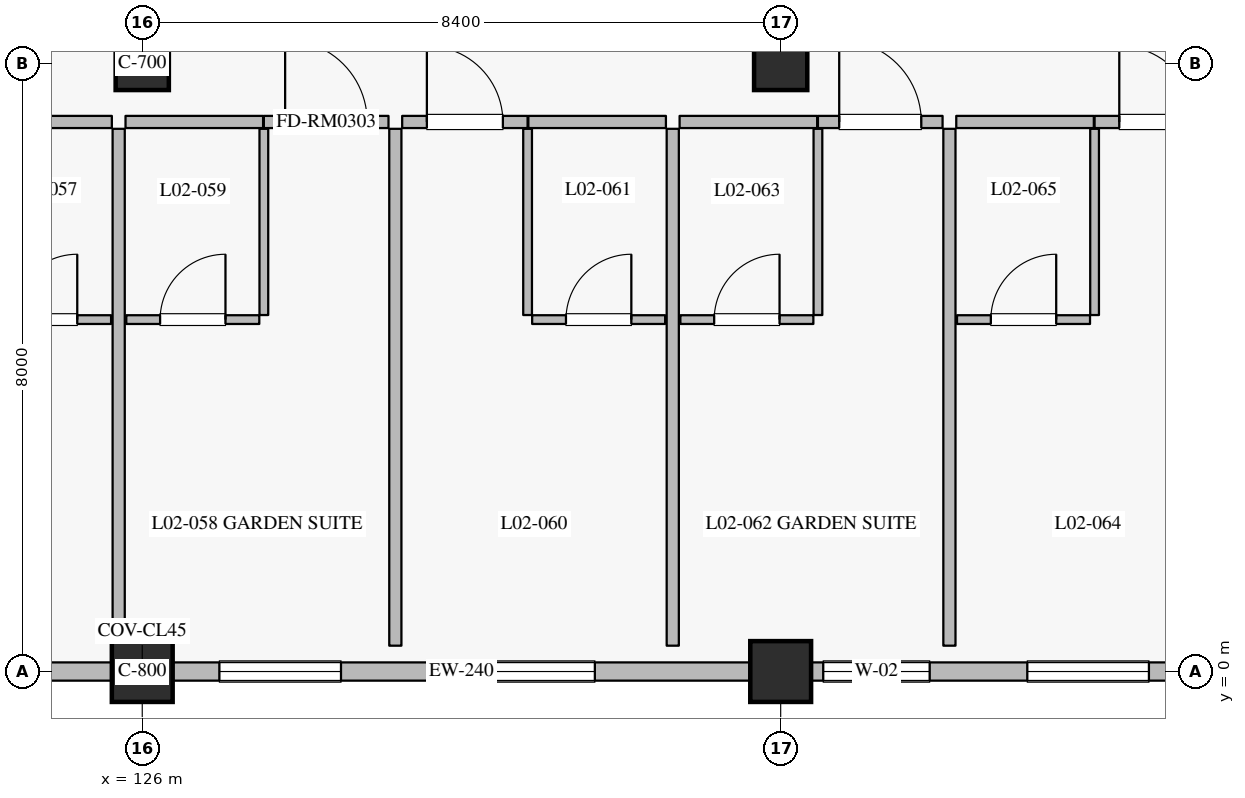
"""IFC4 building model, lengths in metres.
Left out: names, types, materials, properties, quantities, classifications, styles, units other than length and angle.
Written with IfcOpenShell. Run it as: python <this file> out.ifc"""

import sys

from ifc_helpers import new_model, si_unit, direction, frame, frame_2d, origin, origin_2d, place, context, subcontext, project, spatial, rectangle, extrude, element, fill, save


model = new_model("IFC4")
c1 = context("Model", 3, precision=1e-05, world=origin(), true_north=direction((0.0, 1.0)))
c2 = subcontext(c1, "Body", "Model", "MODEL_VIEW")
j1 = project(units=[si_unit("LENGTHUNIT", "METRE"), si_unit("PLANEANGLEUNIT", "RADIAN")], contexts=[c1])
p1 = place(None, origin())
s1 = spatial("IfcSite", under=j1, at=p1, CompositionType="ELEMENT")
p2 = place(p1, origin())
s2 = spatial("IfcBuilding", under=s1, at=p2, CompositionType="ELEMENT")
p3 = place(p2, frame((0.0, 0.0, 11.4)))
s3 = spatial("IfcBuildingStorey", under=s2, at=p3, CompositionType="ELEMENT", Elevation=11.4)
for number, where, z_axis, x_axis in (
    (1, (126.0, 0.0, 0.0), (0.0, 0.0, 1.0), (1.0, 0.0, 0.0)),
    (2, (134.4, 0.0, 0.0), (0.0, 0.0, 1.0), (1.0, 0.0, 0.0)),
):
    element("IfcColumn", number, at=place(p3, frame(where, z_axis=z_axis, x_axis=x_axis)), inside=s3, PredefinedType="COLUMN", context=c2, shape_type="SweptSolid", body=[
        extrude(rectangle(XDim=0.8, YDim=0.8, at=origin_2d()), origin(), (0.0, 0.0, 1.0), 4.8),
    ])
for number, where, z_axis, x_axis in (
    (3, (126.0, 8.0, 0.0), (0.0, 0.0, 1.0), (1.0, 0.0, 0.0)),
    (4, (134.4, 8.0, 0.0), (0.0, 0.0, 1.0), (1.0, 0.0, 0.0)),
):
    element("IfcColumn", number, at=place(p3, frame(where, z_axis=z_axis, x_axis=x_axis)), inside=s3, PredefinedType="COLUMN", context=c2, shape_type="SweptSolid", body=[
        extrude(rectangle(XDim=0.7, YDim=0.7, at=origin_2d()), origin(), (0.0, 0.0, 1.0), 4.8),
    ])
p4 = place(p3, frame((125.6, 0.0, 0.0), z_axis=(0.0, 0.0, 1.0), x_axis=(-1.0, 0.0, 0.0)))
e5 = element("IfcWall", 5, at=p4, inside=s3, PredefinedType="SOLIDWALL", context=c2, shape_type="SweptSolid", body=[
    extrude(rectangle(XDim=7.6, YDim=0.24, at=frame_2d((3.8, 0.0))), origin(), (0.0, 0.0, 1.0), 4.13),
])
p5 = place(p4, frame((0.935, 0.0, 0.8)))
e6 = element("IfcOpeningElement", 6, at=p5, cuts=e5, PredefinedType="OPENING", context=c2, shape_type="SweptSolid", body=[
    extrude(rectangle(XDim=1.6, YDim=1.6, at=frame_2d((0.8, 0.8))), frame((0.0, 0.13, 0.0), z_axis=(0.0, -1.0, 0.0), x_axis=(1.0, 0.0, 0.0)), (0.0, 0.0, 1.0), 0.26),
])
p6 = place(p4, frame((4.58, 0.0, 0.8)))
e7 = element("IfcOpeningElement", 7, at=p6, cuts=e5, PredefinedType="OPENING", context=c2, shape_type="SweptSolid", body=[
    extrude(rectangle(XDim=1.6, YDim=1.6, at=frame_2d((0.8, 0.8))), frame((0.0, 0.13, 0.0), z_axis=(0.0, -1.0, 0.0), x_axis=(1.0, 0.0, 0.0)), (0.0, 0.0, 1.0), 0.26),
])
p7 = place(p3, frame((134.0, 0.0, 0.0), z_axis=(0.0, 0.0, 1.0), x_axis=(-1.0, 0.0, 0.0)))
e8 = element("IfcWall", 8, at=p7, inside=s3, PredefinedType="SOLIDWALL", context=c2, shape_type="SweptSolid", body=[
    extrude(rectangle(XDim=7.6, YDim=0.24, at=frame_2d((3.8, 0.0))), origin(), (0.0, 0.0, 1.0), 4.13),
])
p8 = place(p7, frame((2.045, 0.0, 0.8)))
e9 = element("IfcOpeningElement", 9, at=p8, cuts=e8, PredefinedType="OPENING", context=c2, shape_type="SweptSolid", body=[
    extrude(rectangle(XDim=1.6, YDim=1.6, at=frame_2d((0.8, 0.8))), frame((0.0, 0.13, 0.0), z_axis=(0.0, -1.0, 0.0), x_axis=(1.0, 0.0, 0.0)), (0.0, 0.0, 1.0), 0.26),
])
p9 = place(p7, frame((5.385, 0.0, 0.8)))
e10 = element("IfcOpeningElement", 10, at=p9, cuts=e8, PredefinedType="OPENING", context=c2, shape_type="SweptSolid", body=[
    extrude(rectangle(XDim=1.6, YDim=1.6, at=frame_2d((0.8, 0.8))), frame((0.0, 0.13, 0.0), z_axis=(0.0, -1.0, 0.0), x_axis=(1.0, 0.0, 0.0)), (0.0, 0.0, 1.0), 0.26),
])
p10 = place(p3, frame((142.4, 0.0, 0.0), z_axis=(0.0, 0.0, 1.0), x_axis=(-1.0, 0.0, 0.0)))
e11 = element("IfcWall", 11, at=p10, inside=s3, PredefinedType="SOLIDWALL", context=c2, shape_type="SweptSolid", body=[
    extrude(rectangle(XDim=7.6, YDim=0.24, at=frame_2d((3.8, 0.0))), origin(), (0.0, 0.0, 1.0), 4.13),
])
p11 = place(p10, frame((0.215, 0.0, 0.8)))
e12 = element("IfcOpeningElement", 12, at=p11, cuts=e11, PredefinedType="OPENING", context=c2, shape_type="SweptSolid", body=[
    extrude(rectangle(XDim=1.6, YDim=1.6, at=frame_2d((0.8, 0.8))), frame((0.0, 0.13, 0.0), z_axis=(0.0, -1.0, 0.0), x_axis=(1.0, 0.0, 0.0)), (0.0, 0.0, 1.0), 0.26),
])
p12 = place(p10, frame((3.155, 0.0, 0.8)))
e13 = element("IfcOpeningElement", 13, at=p12, cuts=e11, PredefinedType="OPENING", context=c2, shape_type="SweptSolid", body=[
    extrude(rectangle(XDim=1.6, YDim=1.6, at=frame_2d((0.8, 0.8))), frame((0.0, 0.13, 0.0), z_axis=(0.0, -1.0, 0.0), x_axis=(1.0, 0.0, 0.0)), (0.0, 0.0, 1.0), 0.26),
])
p13 = place(p10, frame((6.04, 0.0, 0.8)))
e14 = element("IfcOpeningElement", 14, at=p13, cuts=e11, PredefinedType="OPENING", context=c2, shape_type="SweptSolid", body=[
    extrude(rectangle(XDim=1.4, YDim=1.6, at=frame_2d((0.7, 0.8))), frame((0.0, 0.13, 0.0), z_axis=(0.0, -1.0, 0.0), x_axis=(1.0, 0.0, 0.0)), (0.0, 0.0, 1.0), 0.26),
])
p14 = place(p3, frame((123.79, 7.23, 0.0), z_axis=(0.0, 0.0, 1.0), x_axis=(1.0, 0.0, 0.0)))
e15 = element("IfcWall", 15, at=p14, inside=s3, PredefinedType="PARTITIONING", context=c2, shape_type="SweptSolid", body=[
    extrude(rectangle(XDim=1.81, YDim=0.16, at=frame_2d((0.905, 0.0))), origin(), (0.0, 0.0, 1.0), 4.535),
])
p15 = place(p3, frame((123.84, 4.63, 0.0), z_axis=(0.0, 0.0, 1.0), x_axis=(1.0, 0.0, 0.0)))
e16 = element("IfcWall", 16, at=p15, inside=s3, PredefinedType="PARTITIONING", context=c2, shape_type="SweptSolid", body=[
    extrude(rectangle(XDim=1.75, YDim=0.115, at=frame_2d((0.875, 0.0))), origin(), (0.0, 0.0, 1.0), 4.535),
])
p16 = place(p15, frame((0.445, 0.0, 0.0)))
e17 = element("IfcOpeningElement", 17, at=p16, cuts=e16, PredefinedType="OPENING", context=c2, shape_type="SweptSolid", body=[
    extrude(rectangle(XDim=0.86, YDim=2.12, at=frame_2d((0.43, 1.06))), frame((0.0, 0.067, 0.0), z_axis=(0.0, -1.0, 0.0), x_axis=(1.0, 0.0, 0.0)), (0.0, 0.0, 1.0), 0.135),
])
p17 = place(p3, frame((125.78, 7.23, 0.0), z_axis=(0.0, 0.0, 1.0), x_axis=(1.0, 0.0, 0.0)))
e18 = element("IfcWall", 18, at=p17, inside=s3, PredefinedType="PARTITIONING", context=c2, shape_type="SweptSolid", body=[
    extrude(rectangle(XDim=1.81, YDim=0.16, at=frame_2d((0.905, 0.0))), origin(), (0.0, 0.0, 1.0), 4.535),
])
p18 = place(p3, frame((127.6, 7.23, 0.0), z_axis=(0.0, 0.0, 1.0), x_axis=(1.0, 0.0, 0.0)))
e19 = element("IfcWall", 19, at=p18, inside=s3, PredefinedType="PARTITIONING", context=c2, shape_type="SweptSolid", body=[
    extrude(rectangle(XDim=1.64, YDim=0.16, at=frame_2d((0.82, 0.0))), origin(), (0.0, 0.0, 1.0), 4.535),
])
p19 = place(p18, frame((0.28, 0.0, 0.0)))
e20 = element("IfcOpeningElement", 20, at=p19, cuts=e19, PredefinedType="OPENING", context=c2, shape_type="SweptSolid", body=[
    extrude(rectangle(XDim=1.08, YDim=2.3, at=frame_2d((0.54, 1.15))), frame((0.0, 0.09, 0.0), z_axis=(0.0, -1.0, 0.0), x_axis=(1.0, 0.0, 0.0)), (0.0, 0.0, 1.0), 0.18),
])
p20 = place(p3, frame((127.6, 4.69, 0.0), z_axis=(0.0, 0.0, 1.0), x_axis=(0.0, 1.0, 0.0)))
e21 = element("IfcWall", 21, at=p20, inside=s3, PredefinedType="PARTITIONING", context=c2, shape_type="SweptSolid", body=[
    extrude(rectangle(XDim=2.45, YDim=0.115, at=frame_2d((1.225, 0.0))), origin(), (0.0, 0.0, 1.0), 4.535),
])
p21 = place(p3, frame((125.79, 4.63, 0.0), z_axis=(0.0, 0.0, 1.0), x_axis=(1.0, 0.0, 0.0)))
e22 = element("IfcWall", 22, at=p21, inside=s3, PredefinedType="PARTITIONING", context=c2, shape_type="SweptSolid", body=[
    extrude(rectangle(XDim=1.75, YDim=0.115, at=frame_2d((0.875, 0.0))), origin(), (0.0, 0.0, 1.0), 4.535),
])
p22 = place(p21, frame((0.445, 0.0, 0.0)))
e23 = element("IfcOpeningElement", 23, at=p22, cuts=e22, PredefinedType="OPENING", context=c2, shape_type="SweptSolid", body=[
    extrude(rectangle(XDim=0.86, YDim=2.12, at=frame_2d((0.43, 1.06))), frame((0.0, 0.067, 0.0), z_axis=(0.0, -1.0, 0.0), x_axis=(1.0, 0.0, 0.0)), (0.0, 0.0, 1.0), 0.135),
])
p23 = place(p3, frame((125.69, 0.34, 0.0), z_axis=(0.0, 0.0, 1.0), x_axis=(0.0, 1.0, 0.0)))
e24 = element("IfcWall", 24, at=p23, inside=s3, PredefinedType="PARTITIONING", context=c2, shape_type="SweptSolid", body=[
    extrude(rectangle(XDim=6.8, YDim=0.16, at=frame_2d((3.4, 0.0))), origin(), (0.0, 0.0, 1.0), 4.535),
])
p24 = place(p3, frame((129.42, 7.23, 0.0), z_axis=(0.0, 0.0, 1.0), x_axis=(1.0, 0.0, 0.0)))
e25 = element("IfcWall", 25, at=p24, inside=s3, PredefinedType="PARTITIONING", context=c2, shape_type="SweptSolid", body=[
    extrude(rectangle(XDim=1.65, YDim=0.16, at=frame_2d((0.825, 0.0))), origin(), (0.0, 0.0, 1.0), 4.535),
])
p25 = place(p24, frame((0.325, 0.0, 0.0)))
e26 = element("IfcOpeningElement", 26, at=p25, cuts=e25, PredefinedType="OPENING", context=c2, shape_type="SweptSolid", body=[
    extrude(rectangle(XDim=1.0, YDim=2.25, at=frame_2d((0.5, 1.125))), frame((0.0, 0.09, 0.0), z_axis=(0.0, -1.0, 0.0), x_axis=(1.0, 0.0, 0.0)), (0.0, 0.0, 1.0), 0.18),
])
p26 = place(p3, frame((131.08, 7.23, 0.0), z_axis=(0.0, 0.0, 1.0), x_axis=(1.0, 0.0, 0.0)))
e27 = element("IfcWall", 27, at=p26, inside=s3, PredefinedType="PARTITIONING", context=c2, shape_type="SweptSolid", body=[
    extrude(rectangle(XDim=1.81, YDim=0.16, at=frame_2d((0.905, 0.0))), origin(), (0.0, 0.0, 1.0), 4.535),
])
p27 = place(p3, frame((131.07, 4.69, 0.0), z_axis=(0.0, 0.0, 1.0), x_axis=(0.0, 1.0, 0.0)))
e28 = element("IfcWall", 28, at=p27, inside=s3, PredefinedType="PARTITIONING", context=c2, shape_type="SweptSolid", body=[
    extrude(rectangle(XDim=2.45, YDim=0.115, at=frame_2d((1.225, 0.0))), origin(), (0.0, 0.0, 1.0), 4.535),
])
p28 = place(p3, frame((131.13, 4.63, 0.0), z_axis=(0.0, 0.0, 1.0), x_axis=(1.0, 0.0, 0.0)))
e29 = element("IfcWall", 29, at=p28, inside=s3, PredefinedType="PARTITIONING", context=c2, shape_type="SweptSolid", body=[
    extrude(rectangle(XDim=1.75, YDim=0.115, at=frame_2d((0.875, 0.0))), origin(), (0.0, 0.0, 1.0), 4.535),
])
p29 = place(p28, frame((0.445, 0.0, 0.0)))
e30 = element("IfcOpeningElement", 30, at=p29, cuts=e29, PredefinedType="OPENING", context=c2, shape_type="SweptSolid", body=[
    extrude(rectangle(XDim=0.86, YDim=2.12, at=frame_2d((0.43, 1.06))), frame((0.0, 0.067, 0.0), z_axis=(0.0, -1.0, 0.0), x_axis=(1.0, 0.0, 0.0)), (0.0, 0.0, 1.0), 0.135),
])
p30 = place(p3, frame((129.33, 0.34, 0.0), z_axis=(0.0, 0.0, 1.0), x_axis=(0.0, 1.0, 0.0)))
e31 = element("IfcWall", 31, at=p30, inside=s3, PredefinedType="PARTITIONING", context=c2, shape_type="SweptSolid", body=[
    extrude(rectangle(XDim=6.8, YDim=0.16, at=frame_2d((3.4, 0.0))), origin(), (0.0, 0.0, 1.0), 4.535),
])
p31 = place(p3, frame((133.07, 7.23, 0.0), z_axis=(0.0, 0.0, 1.0), x_axis=(1.0, 0.0, 0.0)))
e32 = element("IfcWall", 32, at=p31, inside=s3, PredefinedType="PARTITIONING", context=c2, shape_type="SweptSolid", body=[
    extrude(rectangle(XDim=1.81, YDim=0.16, at=frame_2d((0.905, 0.0))), origin(), (0.0, 0.0, 1.0), 4.535),
])
p32 = place(p3, frame((134.89, 7.23, 0.0), z_axis=(0.0, 0.0, 1.0), x_axis=(1.0, 0.0, 0.0)))
e33 = element("IfcWall", 33, at=p32, inside=s3, PredefinedType="PARTITIONING", context=c2, shape_type="SweptSolid", body=[
    extrude(rectangle(XDim=1.64, YDim=0.16, at=frame_2d((0.82, 0.0))), origin(), (0.0, 0.0, 1.0), 4.535),
])
p33 = place(p32, frame((0.28, 0.0, 0.0)))
e34 = element("IfcOpeningElement", 34, at=p33, cuts=e33, PredefinedType="OPENING", context=c2, shape_type="SweptSolid", body=[
    extrude(rectangle(XDim=1.08, YDim=2.3, at=frame_2d((0.54, 1.15))), frame((0.0, 0.09, 0.0), z_axis=(0.0, -1.0, 0.0), x_axis=(1.0, 0.0, 0.0)), (0.0, 0.0, 1.0), 0.18),
])
p34 = place(p3, frame((134.89, 4.69, 0.0), z_axis=(0.0, 0.0, 1.0), x_axis=(0.0, 1.0, 0.0)))
e35 = element("IfcWall", 35, at=p34, inside=s3, PredefinedType="PARTITIONING", context=c2, shape_type="SweptSolid", body=[
    extrude(rectangle(XDim=2.45, YDim=0.115, at=frame_2d((1.225, 0.0))), origin(), (0.0, 0.0, 1.0), 4.535),
])
p35 = place(p3, frame((133.08, 4.63, 0.0), z_axis=(0.0, 0.0, 1.0), x_axis=(1.0, 0.0, 0.0)))
e36 = element("IfcWall", 36, at=p35, inside=s3, PredefinedType="PARTITIONING", context=c2, shape_type="SweptSolid", body=[
    extrude(rectangle(XDim=1.75, YDim=0.115, at=frame_2d((0.875, 0.0))), origin(), (0.0, 0.0, 1.0), 4.535),
])
p36 = place(p35, frame((0.445, 0.0, 0.0)))
e37 = element("IfcOpeningElement", 37, at=p36, cuts=e36, PredefinedType="OPENING", context=c2, shape_type="SweptSolid", body=[
    extrude(rectangle(XDim=0.86, YDim=2.12, at=frame_2d((0.43, 1.06))), frame((0.0, 0.067, 0.0), z_axis=(0.0, -1.0, 0.0), x_axis=(1.0, 0.0, 0.0)), (0.0, 0.0, 1.0), 0.135),
])
p37 = place(p3, frame((132.98, 0.34, 0.0), z_axis=(0.0, 0.0, 1.0), x_axis=(0.0, 1.0, 0.0)))
e38 = element("IfcWall", 38, at=p37, inside=s3, PredefinedType="PARTITIONING", context=c2, shape_type="SweptSolid", body=[
    extrude(rectangle(XDim=6.8, YDim=0.16, at=frame_2d((3.4, 0.0))), origin(), (0.0, 0.0, 1.0), 4.535),
])
p38 = place(p3, frame((136.71, 7.23, 0.0), z_axis=(0.0, 0.0, 1.0), x_axis=(1.0, 0.0, 0.0)))
e39 = element("IfcWall", 39, at=p38, inside=s3, PredefinedType="PARTITIONING", context=c2, shape_type="SweptSolid", body=[
    extrude(rectangle(XDim=1.81, YDim=0.16, at=frame_2d((0.905, 0.0))), origin(), (0.0, 0.0, 1.0), 4.535),
])
p39 = place(p3, frame((138.53, 7.23, 0.0), z_axis=(0.0, 0.0, 1.0), x_axis=(1.0, 0.0, 0.0)))
e40 = element("IfcWall", 40, at=p39, inside=s3, PredefinedType="PARTITIONING", context=c2, shape_type="SweptSolid", body=[
    extrude(rectangle(XDim=1.65, YDim=0.16, at=frame_2d((0.825, 0.0))), origin(), (0.0, 0.0, 1.0), 4.535),
])
p40 = place(p39, frame((0.325, 0.0, 0.0)))
e41 = element("IfcOpeningElement", 41, at=p40, cuts=e40, PredefinedType="OPENING", context=c2, shape_type="SweptSolid", body=[
    extrude(rectangle(XDim=1.0, YDim=2.25, at=frame_2d((0.5, 1.125))), frame((0.0, 0.09, 0.0), z_axis=(0.0, -1.0, 0.0), x_axis=(1.0, 0.0, 0.0)), (0.0, 0.0, 1.0), 0.18),
])
p41 = place(p3, frame((138.53, 4.69, 0.0), z_axis=(0.0, 0.0, 1.0), x_axis=(0.0, 1.0, 0.0)))
e42 = element("IfcWall", 42, at=p41, inside=s3, PredefinedType="PARTITIONING", context=c2, shape_type="SweptSolid", body=[
    extrude(rectangle(XDim=2.45, YDim=0.115, at=frame_2d((1.225, 0.0))), origin(), (0.0, 0.0, 1.0), 4.535),
])
p42 = place(p3, frame((136.72, 4.63, 0.0), z_axis=(0.0, 0.0, 1.0), x_axis=(1.0, 0.0, 0.0)))
e43 = element("IfcWall", 43, at=p42, inside=s3, PredefinedType="PARTITIONING", context=c2, shape_type="SweptSolid", body=[
    extrude(rectangle(XDim=1.75, YDim=0.115, at=frame_2d((0.875, 0.0))), origin(), (0.0, 0.0, 1.0), 4.535),
])
p43 = place(p42, frame((0.445, 0.0, 0.0)))
e44 = element("IfcOpeningElement", 44, at=p43, cuts=e43, PredefinedType="OPENING", context=c2, shape_type="SweptSolid", body=[
    extrude(rectangle(XDim=0.86, YDim=2.12, at=frame_2d((0.43, 1.06))), frame((0.0, 0.067, 0.0), z_axis=(0.0, -1.0, 0.0), x_axis=(1.0, 0.0, 0.0)), (0.0, 0.0, 1.0), 0.135),
])
p44 = place(p3, frame((136.62, 0.34, 0.0), z_axis=(0.0, 0.0, 1.0), x_axis=(0.0, 1.0, 0.0)))
e45 = element("IfcWall", 45, at=p44, inside=s3, PredefinedType="PARTITIONING", context=c2, shape_type="SweptSolid", body=[
    extrude(rectangle(XDim=6.8, YDim=0.16, at=frame_2d((3.4, 0.0))), origin(), (0.0, 0.0, 1.0), 4.535),
])
p45 = place(p8, origin())
e46 = element("IfcWindow", 46, at=p45, inside=s3, PartitioningType="SINGLE_PANEL", PredefinedType="WINDOW", context=c2, shape_type="SweptSolid", body=[
    extrude(rectangle(XDim=1.6, YDim=1.6, at=frame_2d((0.8, 0.8))), frame((0.0, 0.03, 0.0), z_axis=(0.0, -1.0, 0.0), x_axis=(1.0, 0.0, 0.0)), (0.0, 0.0, 1.0), 0.06),
])
fill(e9, e46)
p46 = place(p9, origin())
e47 = element("IfcWindow", 47, at=p46, inside=s3, PartitioningType="SINGLE_PANEL", PredefinedType="WINDOW", context=c2, shape_type="SweptSolid", body=[
    extrude(rectangle(XDim=1.6, YDim=1.6, at=frame_2d((0.8, 0.8))), frame((0.0, 0.03, 0.0), z_axis=(0.0, -1.0, 0.0), x_axis=(1.0, 0.0, 0.0)), (0.0, 0.0, 1.0), 0.06),
])
fill(e10, e47)
p47 = place(p12, origin())
e48 = element("IfcWindow", 48, at=p47, inside=s3, PartitioningType="SINGLE_PANEL", PredefinedType="WINDOW", context=c2, shape_type="SweptSolid", body=[
    extrude(rectangle(XDim=1.6, YDim=1.6, at=frame_2d((0.8, 0.8))), frame((0.0, 0.03, 0.0), z_axis=(0.0, -1.0, 0.0), x_axis=(1.0, 0.0, 0.0)), (0.0, 0.0, 1.0), 0.06),
])
fill(e13, e48)
p48 = place(p13, origin())
e49 = element("IfcWindow", 49, at=p48, inside=s3, PartitioningType="SINGLE_PANEL", PredefinedType="WINDOW", context=c2, shape_type="SweptSolid", body=[
    extrude(rectangle(XDim=1.4, YDim=1.6, at=frame_2d((0.7, 0.8))), frame((0.0, 0.03, 0.0), z_axis=(0.0, -1.0, 0.0), x_axis=(1.0, 0.0, 0.0)), (0.0, 0.0, 1.0), 0.06),
])
fill(e14, e49)
p49 = place(p16, origin())
e50 = element("IfcDoor", 50, at=p49, inside=s3, OperationType="SINGLE_SWING_RIGHT", PredefinedType="DOOR", context=c2, shape_type="SweptSolid", body=[
    extrude(rectangle(XDim=0.86, YDim=2.12, at=frame_2d((0.43, 1.06))), frame((0.0, 0.025, 0.0), z_axis=(0.0, -1.0, 0.0), x_axis=(1.0, 0.0, 0.0)), (0.0, 0.0, 1.0), 0.05),
])
fill(e17, e50)
p50 = place(p19, origin())
e51 = element("IfcDoor", 51, at=p50, inside=s3, OperationType="SINGLE_SWING_LEFT", PredefinedType="DOOR", context=c2, shape_type="SweptSolid", body=[
    extrude(rectangle(XDim=1.08, YDim=2.3, at=frame_2d((0.54, 1.15))), frame((0.0, 0.025, 0.0), z_axis=(0.0, -1.0, 0.0), x_axis=(1.0, 0.0, 0.0)), (0.0, 0.0, 1.0), 0.05),
])
fill(e20, e51)
p51 = place(p22, origin())
e52 = element("IfcDoor", 52, at=p51, inside=s3, OperationType="SINGLE_SWING_RIGHT", PredefinedType="DOOR", context=c2, shape_type="SweptSolid", body=[
    extrude(rectangle(XDim=0.86, YDim=2.12, at=frame_2d((0.43, 1.06))), frame((0.0, 0.025, 0.0), z_axis=(0.0, -1.0, 0.0), x_axis=(1.0, 0.0, 0.0)), (0.0, 0.0, 1.0), 0.05),
])
fill(e23, e52)
p52 = place(p25, origin())
e53 = element("IfcDoor", 53, at=p52, inside=s3, OperationType="SINGLE_SWING_LEFT", PredefinedType="DOOR", context=c2, shape_type="SweptSolid", body=[
    extrude(rectangle(XDim=1.0, YDim=2.25, at=frame_2d((0.5, 1.125))), frame((0.0, 0.025, 0.0), z_axis=(0.0, -1.0, 0.0), x_axis=(1.0, 0.0, 0.0)), (0.0, 0.0, 1.0), 0.05),
])
fill(e26, e53)
p53 = place(p29, origin())
e54 = element("IfcDoor", 54, at=p53, inside=s3, OperationType="SINGLE_SWING_RIGHT", PredefinedType="DOOR", context=c2, shape_type="SweptSolid", body=[
    extrude(rectangle(XDim=0.86, YDim=2.12, at=frame_2d((0.43, 1.06))), frame((0.0, 0.025, 0.0), z_axis=(0.0, -1.0, 0.0), x_axis=(1.0, 0.0, 0.0)), (0.0, 0.0, 1.0), 0.05),
])
fill(e30, e54)
p54 = place(p33, origin())
e55 = element("IfcDoor", 55, at=p54, inside=s3, OperationType="SINGLE_SWING_LEFT", PredefinedType="DOOR", context=c2, shape_type="SweptSolid", body=[
    extrude(rectangle(XDim=1.08, YDim=2.3, at=frame_2d((0.54, 1.15))), frame((0.0, 0.025, 0.0), z_axis=(0.0, -1.0, 0.0), x_axis=(1.0, 0.0, 0.0)), (0.0, 0.0, 1.0), 0.05),
])
fill(e34, e55)
p55 = place(p36, origin())
e56 = element("IfcDoor", 56, at=p55, inside=s3, OperationType="SINGLE_SWING_RIGHT", PredefinedType="DOOR", context=c2, shape_type="SweptSolid", body=[
    extrude(rectangle(XDim=0.86, YDim=2.12, at=frame_2d((0.43, 1.06))), frame((0.0, 0.025, 0.0), z_axis=(0.0, -1.0, 0.0), x_axis=(1.0, 0.0, 0.0)), (0.0, 0.0, 1.0), 0.05),
])
fill(e37, e56)
p56 = place(p40, origin())
e57 = element("IfcDoor", 57, at=p56, inside=s3, OperationType="SINGLE_SWING_LEFT", PredefinedType="DOOR", context=c2, shape_type="SweptSolid", body=[
    extrude(rectangle(XDim=1.0, YDim=2.25, at=frame_2d((0.5, 1.125))), frame((0.0, 0.025, 0.0), z_axis=(0.0, -1.0, 0.0), x_axis=(1.0, 0.0, 0.0)), (0.0, 0.0, 1.0), 0.05),
])
fill(e41, e57)
p57 = place(p43, origin())
e58 = element("IfcDoor", 58, at=p57, inside=s3, OperationType="SINGLE_SWING_RIGHT", PredefinedType="DOOR", context=c2, shape_type="SweptSolid", body=[
    extrude(rectangle(XDim=0.86, YDim=2.12, at=frame_2d((0.43, 1.06))), frame((0.0, 0.025, 0.0), z_axis=(0.0, -1.0, 0.0), x_axis=(1.0, 0.0, 0.0)), (0.0, 0.0, 1.0), 0.05),
])
fill(e44, e58)
save(model, sys.argv[1])
